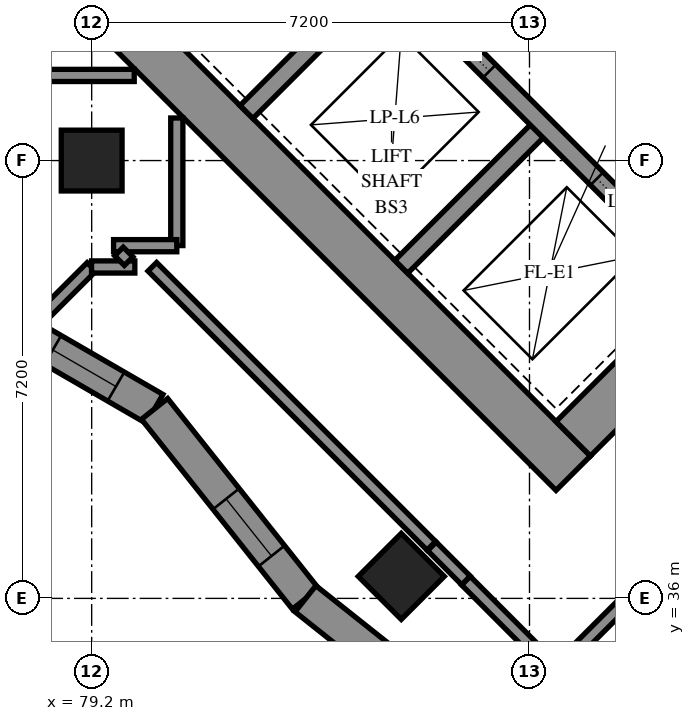
"""IFC4 building model, lengths in metres.
Left out: names, types, materials, properties, quantities, classifications, styles, units other than length and angle.
Written with IfcOpenShell. Run it as: python <this file> out.ifc"""

import sys

from ifc_helpers import new_model, si_unit, direction, frame, frame_2d, origin, origin_2d, place, context, subcontext, project, spatial, polyline, rectangle, outline, extrude, element, fill, save


model = new_model("IFC4")
c1 = context("Model", 3, precision=1e-05, world=origin(), true_north=direction((0.0, 1.0)))
c2 = subcontext(c1, "Body", "Model", "MODEL_VIEW")
j1 = project(units=[si_unit("LENGTHUNIT", "METRE"), si_unit("PLANEANGLEUNIT", "RADIAN")], contexts=[c1])
p1 = place(None, origin())
s1 = spatial("IfcSite", under=j1, at=p1, CompositionType="ELEMENT")
p2 = place(p1, origin())
s2 = spatial("IfcBuilding", under=s1, at=p2, CompositionType="ELEMENT")
p3 = place(p2, frame((0.0, 0.0, 98.2)))
s3 = spatial("IfcBuildingStorey", under=s2, at=p3, CompositionType="ELEMENT", Elevation=98.2)
for number, where, z_axis, x_axis in (
    (1, (79.2, 43.2, 0.0), (0.0, 0.0, 1.0), (1.0, 0.0, 0.0)),
    (2, (84.291, 36.362, 0.0), (0.0, 0.0, 1.0), (0.707, -0.707, 0.0)),
):
    element("IfcColumn", number, at=place(p3, frame(where, z_axis=z_axis, x_axis=x_axis)), inside=s3, PredefinedType="COLUMN", context=c2, shape_type="SweptSolid", body=[
        extrude(rectangle(XDim=1.0, YDim=1.0, at=origin_2d()), origin(), (0.0, 0.0, 1.0), 3.1),
    ])
p4 = place(p3, frame((75.806, 49.373, -0.3), z_axis=(0.0, 0.0, 1.0), x_axis=(0.7071067812, -0.7071067812, 0.0)))
e3 = element("IfcWall", 3, at=p4, inside=s3, PredefinedType="SHEAR", context=c2, shape_type="SweptSolid", body=[
    extrude(rectangle(XDim=16.0, YDim=0.8, at=frame_2d((8.0, 0.0))), origin(), (0.0, 0.0, 1.0), 2.7),
])
p5 = place(p3, frame((87.12, 38.625, -0.3), z_axis=(0.0, 0.0, 1.0), x_axis=(0.7071067812, 0.7071067812, 0.0)))
e4 = element("IfcWall", 4, at=p5, inside=s3, PredefinedType="SHEAR", context=c2, shape_type="SweptSolid", body=[
    extrude(rectangle(XDim=14.4, YDim=0.8, at=frame_2d((7.2, 0.0))), origin(), (0.0, 0.0, 1.0), 2.7),
])
p6 = place(p5, frame((4.55, 0.0, 0.3)))
e5 = element("IfcOpeningElement", 5, at=p6, cuts=e4, PredefinedType="OPENING", context=c2, shape_type="SweptSolid", body=[
    extrude(rectangle(XDim=1.1, YDim=2.1, at=frame_2d((0.55, 1.05))), frame((0.0, 0.41, 0.0), z_axis=(0.0, -1.0, 0.0), x_axis=(1.0, 0.0, 0.0)), (0.0, 0.0, 1.0), 0.82),
])
p7 = place(p5, frame((11.35, 0.0, 0.3)))
e6 = element("IfcOpeningElement", 6, at=p7, cuts=e4, PredefinedType="OPENING", context=c2, shape_type="SweptSolid", body=[
    extrude(rectangle(XDim=1.1, YDim=2.1, at=frame_2d((0.55, 1.05))), frame((0.0, 0.41, 0.0), z_axis=(0.0, -1.0, 0.0), x_axis=(1.0, 0.0, 0.0)), (0.0, 0.0, 1.0), 0.82),
])
for number, where, z_axis, x_axis in (
    (7, (81.746, 43.999, 0.0), (0.0, 0.0, 1.0), (0.707, 0.707, 0.0)),
    (8, (84.291, 41.453, 0.0), (0.0, 0.0, 1.0), (0.707, 0.707, 0.0)),
):
    element("IfcWall", number, at=place(p3, frame(where, z_axis=z_axis, x_axis=x_axis)), inside=s3, PredefinedType="SOLIDWALL", context=c2, shape_type="SweptSolid", body=[
        extrude(rectangle(XDim=3.3, YDim=0.3, at=frame_2d((1.65, 0.0))), origin(), (0.0, 0.0, 1.0), 3.1),
    ])
p8 = place(p3, frame((78.988, 51.423, 0.0), z_axis=(0.0, 0.0, 1.0), x_axis=(0.7071067812, -0.7071067812, 0.0)))
e9 = element("IfcWall", 9, at=p8, inside=s3, PredefinedType="SOLIDWALL", context=c2, shape_type="SweptSolid", body=[
    extrude(rectangle(XDim=14.4, YDim=0.3, at=frame_2d((7.2, 0.0))), origin(), (0.0, 0.0, 1.0), 3.1),
])
p9 = place(p8, frame((1.25, 0.0, 0.0)))
e10 = element("IfcOpeningElement", 10, at=p9, cuts=e9, PredefinedType="OPENING", context=c2, shape_type="SweptSolid", body=[
    extrude(rectangle(XDim=1.1, YDim=2.1, at=frame_2d((0.55, 1.05))), frame((0.0, 0.16, 0.0), z_axis=(0.0, -1.0, 0.0), x_axis=(1.0, 0.0, 0.0)), (0.0, 0.0, 1.0), 0.32),
])
p10 = place(p8, frame((4.85, 0.0, 0.0)))
e11 = element("IfcOpeningElement", 11, at=p10, cuts=e9, PredefinedType="OPENING", context=c2, shape_type="SweptSolid", body=[
    extrude(rectangle(XDim=1.1, YDim=2.1, at=frame_2d((0.55, 1.05))), frame((0.0, 0.16, 0.0), z_axis=(0.0, -1.0, 0.0), x_axis=(1.0, 0.0, 0.0)), (0.0, 0.0, 1.0), 0.32),
])
p11 = place(p8, frame((8.45, 0.0, 0.0)))
e12 = element("IfcOpeningElement", 12, at=p11, cuts=e9, PredefinedType="OPENING", context=c2, shape_type="SweptSolid", body=[
    extrude(rectangle(XDim=1.1, YDim=2.1, at=frame_2d((0.55, 1.05))), frame((0.0, 0.16, 0.0), z_axis=(0.0, -1.0, 0.0), x_axis=(1.0, 0.0, 0.0)), (0.0, 0.0, 1.0), 0.32),
])
p12 = place(p8, frame((12.05, 0.0, 0.0)))
e13 = element("IfcOpeningElement", 13, at=p12, cuts=e9, PredefinedType="OPENING", context=c2, shape_type="SweptSolid", body=[
    extrude(rectangle(XDim=1.1, YDim=2.1, at=frame_2d((0.55, 1.05))), frame((0.0, 0.16, 0.0), z_axis=(0.0, -1.0, 0.0), x_axis=(1.0, 0.0, 0.0)), (0.0, 0.0, 1.0), 0.32),
])
p13 = place(p3, frame((81.534, 53.969, 0.0), z_axis=(0.0, 0.0, 1.0), x_axis=(0.707103309, -0.7071102534, 0.0)))
e14 = element("IfcWall", 14, at=p13, inside=s3, PredefinedType="SOLIDWALL", context=c2, shape_type="SweptSolid", body=[
    extrude(rectangle(XDim=14.4, YDim=0.3, at=frame_2d((7.2, 0.0))), origin(), (0.0, 0.0, 1.0), 3.1),
])
p14 = place(p13, frame((12.05, 0.0, 0.0)))
e15 = element("IfcOpeningElement", 15, at=p14, cuts=e14, PredefinedType="OPENING", context=c2, shape_type="SweptSolid", body=[
    extrude(rectangle(XDim=1.1, YDim=2.1, at=frame_2d((0.55, 1.05))), frame((0.0, 0.16, 0.0), z_axis=(0.0, -1.0, 0.0), x_axis=(1.0, 0.0, 0.0)), (0.0, 0.0, 1.0), 0.32),
])
p15 = place(p3, frame((76.631, 41.203, 0.0), z_axis=(0.0, 0.0, 1.0), x_axis=(0.8653939422, -0.501092132, 0.0)))
e16 = element("IfcWall", 16, at=p15, inside=s3, PredefinedType="SOLIDWALL", context=c2, shape_type="SweptSolid", body=[
    extrude(outline(polyline([(0.031, -0.275), (4.111, -0.275), (4.215, 0.275), (-0.031, 0.275), (0.031, -0.275)])), origin(), (0.0, 0.0, 1.0), 3.1),
])
p16 = place(p15, frame((0.348, 0.0, 0.5)))
e17 = element("IfcOpeningElement", 17, at=p16, cuts=e16, PredefinedType="OPENING", context=c2, shape_type="SweptSolid", body=[
    extrude(rectangle(XDim=1.2, YDim=2.45, at=frame_2d((0.6, 1.225))), frame((0.0, 0.285, 0.0), z_axis=(0.0, -1.0, 0.0), x_axis=(1.0, 0.0, 0.0)), (0.0, 0.0, 1.0), 0.57),
])
p17 = place(p15, frame((2.23, 0.0, 0.5)))
e18 = element("IfcOpeningElement", 18, at=p17, cuts=e16, PredefinedType="OPENING", context=c2, shape_type="SweptSolid", body=[
    extrude(rectangle(XDim=1.2, YDim=2.45, at=frame_2d((0.6, 1.225))), frame((0.0, 0.285, 0.0), z_axis=(0.0, -1.0, 0.0), x_axis=(1.0, 0.0, 0.0)), (0.0, 0.0, 1.0), 0.57),
])
p18 = place(p3, frame((80.234, 39.116, 0.0), z_axis=(0.0, 0.0, 1.0), x_axis=(0.6221724239, -0.782880243, 0.0)))
e19 = element("IfcWall", 19, at=p18, inside=s3, PredefinedType="SOLIDWALL", context=c2, shape_type="SweptSolid", body=[
    extrude(outline(polyline([(0.052, -0.275), (4.02, -0.275), (3.957, 0.275), (-0.052, 0.275), (0.052, -0.275)])), origin(), (0.0, 0.0, 1.0), 3.1),
])
p19 = place(p18, frame((1.891, 0.0, 0.5)))
e20 = element("IfcOpeningElement", 20, at=p19, cuts=e19, PredefinedType="OPENING", context=c2, shape_type="SweptSolid", body=[
    extrude(rectangle(XDim=1.2, YDim=2.45, at=frame_2d((0.6, 1.225))), frame((0.0, 0.285, 0.0), z_axis=(0.0, -1.0, 0.0), x_axis=(1.0, 0.0, 0.0)), (0.0, 0.0, 1.0), 0.57),
])
p20 = place(p3, frame((82.716, 35.994, 0.0), z_axis=(0.0, 0.0, 1.0), x_axis=(0.7828931284, -0.6221562099, 0.0)))
e21 = element("IfcWall", 21, at=p20, inside=s3, PredefinedType="SOLIDWALL", context=c2, shape_type="SweptSolid", body=[
    extrude(outline(polyline([(-0.032, -0.275), (3.937, -0.275), (3.999, 0.275), (0.032, 0.275), (-0.032, -0.275)])), origin(), (0.0, 0.0, 1.0), 3.1),
])
p21 = place(p20, frame((1.714, 0.0, 0.5)))
e22 = element("IfcOpeningElement", 22, at=p21, cuts=e21, PredefinedType="OPENING", context=c2, shape_type="SweptSolid", body=[
    extrude(rectangle(XDim=1.2, YDim=2.45, at=frame_2d((0.6, 1.225))), frame((0.0, 0.285, 0.0), z_axis=(0.0, -1.0, 0.0), x_axis=(1.0, 0.0, 0.0)), (0.0, 0.0, 1.0), 0.57),
])
p22 = place(p3, frame((86.835, 34.806, 0.0), z_axis=(0.0, 0.0, 1.0), x_axis=(0.7071067812, 0.7071067812, 0.0)))
e23 = element("IfcWall", 23, at=p22, inside=s3, PredefinedType="PARTITIONING", context=c2, shape_type="SweptSolid", body=[
    extrude(rectangle(XDim=9.201, YDim=0.2, at=frame_2d((4.601, 0.0))), origin(), (0.0, 0.0, 1.0), 3.1),
])
p23 = place(p3, frame((86.341, 33.315, 0.0), z_axis=(0.0, 0.0, 1.0), x_axis=(0.7069849041, 0.7072286373, 0.0)))
e24 = element("IfcWall", 24, at=p23, inside=s3, PredefinedType="PARTITIONING", context=c2, shape_type="SweptSolid", body=[
    extrude(rectangle(XDim=8.206, YDim=0.2, at=frame_2d((4.103, 0.0))), origin(), (0.0, 0.0, 1.0), 3.1),
])
p24 = place(p3, frame((80.197, 41.453, 0.0), z_axis=(0.0, 0.0, 1.0), x_axis=(0.7071067812, -0.7071067812, 0.0)))
e25 = element("IfcWall", 25, at=p24, inside=s3, PredefinedType="PARTITIONING", context=c2, shape_type="SweptSolid", body=[
    extrude(rectangle(XDim=6.488, YDim=0.2, at=frame_2d((3.244, 0.0))), origin(), (0.0, 0.0, 1.0), 3.1),
])
p25 = place(p3, frame((85.353, 36.293, 0.0), z_axis=(0.0, 0.0, 1.0), x_axis=(0.7066304548, -0.7075827869, 0.0)))
e26 = element("IfcWall", 26, at=p25, inside=s3, PredefinedType="PARTITIONING", context=c2, shape_type="SweptSolid", body=[
    extrude(rectangle(XDim=2.1, YDim=0.2, at=frame_2d((1.05, 0.0))), origin(), (0.0, 0.0, 1.0), 3.1),
])
for number, where, z_axis, x_axis in (
    (27, (77.802, 44.6, 0.0), (0.0, 0.0, 1.0), (1.0, 0.0, 0.0)),
    (28, (80.6, 41.802, 0.0), (0.0, 0.0, 1.0), (0.0, 1.0, 0.0)),
):
    element("IfcWall", number, at=place(p3, frame(where, z_axis=z_axis, x_axis=x_axis)), inside=s3, PredefinedType="PARTITIONING", context=c2, shape_type="SweptSolid", body=[
        extrude(rectangle(XDim=2.098, YDim=0.2, at=frame_2d((1.049, 0.0))), origin(), (0.0, 0.0, 1.0), 3.1),
    ])
p26 = place(p3, frame((78.3, 40.554, 0.0), z_axis=(0.0, 0.0, 1.0), x_axis=(0.7071462414, 0.7070673188, 0.0)))
e29 = element("IfcWall", 29, at=p26, inside=s3, PredefinedType="PARTITIONING", context=c2, shape_type="SweptSolid", body=[
    extrude(rectangle(XDim=1.267, YDim=0.2, at=frame_2d((0.633, 0.0))), origin(), (0.0, 0.0, 1.0), 3.1),
])
p27 = place(p3, frame((79.56, 41.8, 0.0), z_axis=(0.0, 0.0, 1.0), x_axis=(1.0, 0.0, 0.0)))
e30 = element("IfcWall", 30, at=p27, inside=s3, PredefinedType="PARTITIONING", context=c2, shape_type="SweptSolid", body=[
    extrude(rectangle(XDim=1.04, YDim=0.2, at=frame_2d((0.52, 0.0))), origin(), (0.0, 0.0, 1.0), 3.1),
])
p28 = place(p3, frame((84.795, 36.855, 0.0), z_axis=(0.0, 0.0, 1.0), x_axis=(0.7071067812, -0.7071067812, 0.0)))
e31 = element("IfcWall", 31, at=p28, inside=s3, PredefinedType="PARTITIONING", context=c2, shape_type="SweptSolid", body=[
    extrude(rectangle(XDim=0.792, YDim=0.2, at=frame_2d((0.396, 0.0))), origin(), (0.0, 0.0, 1.0), 3.1),
])
p29 = place(p3, frame((79.198, 41.45, 0.0), z_axis=(0.0, 0.0, 1.0), x_axis=(1.0, 0.0, 0.0)))
e32 = element("IfcWall", 32, at=p29, inside=s3, PredefinedType="PARTITIONING", context=c2, shape_type="SweptSolid", body=[
    extrude(rectangle(XDim=0.712, YDim=0.2, at=frame_2d((0.356, 0.0))), origin(), (0.0, 0.0, 1.0), 3.1),
])
p30 = place(p3, frame((79.649, 41.705, 0.0), z_axis=(0.0, 0.0, 1.0), x_axis=(0.7068844555, -0.707329037, 0.0)))
e33 = element("IfcWall", 33, at=p30, inside=s3, PredefinedType="PARTITIONING", context=c2, shape_type="SweptSolid", body=[
    extrude(rectangle(XDim=0.225, YDim=0.2, at=frame_2d((0.112, 0.0))), origin(), (0.0, 0.0, 1.0), 3.1),
])
p31 = place(p17, origin())
e34 = element("IfcWindow", 34, at=p31, inside=s3, PartitioningType="SINGLE_PANEL", PredefinedType="WINDOW", context=c2, shape_type="SweptSolid", body=[
    extrude(rectangle(XDim=1.2, YDim=2.45, at=frame_2d((0.6, 1.225))), frame((0.0, 0.155, 0.0), z_axis=(0.0, -1.0, 0.0), x_axis=(1.0, 0.0, 0.0)), (0.0, 0.0, 1.0), 0.06),
])
fill(e18, e34)
p32 = place(p19, origin())
e35 = element("IfcWindow", 35, at=p32, inside=s3, PartitioningType="SINGLE_PANEL", PredefinedType="WINDOW", context=c2, shape_type="SweptSolid", body=[
    extrude(rectangle(XDim=1.2, YDim=2.45, at=frame_2d((0.6, 1.225))), frame((0.0, 0.155, 0.0), z_axis=(0.0, -1.0, 0.0), x_axis=(1.0, 0.0, 0.0)), (0.0, 0.0, 1.0), 0.06),
])
fill(e20, e35)
p33 = place(p11, origin())
e36 = element("IfcDoor", 36, at=p33, inside=s3, OperationType="SLIDING_TO_LEFT", PredefinedType="DOOR", context=c2, shape_type="SweptSolid", body=[
    extrude(rectangle(XDim=1.1, YDim=2.1, at=frame_2d((0.55, 1.05))), frame((0.0, 0.025, 0.0), z_axis=(0.0, -1.0, 0.0), x_axis=(1.0, 0.0, 0.0)), (0.0, 0.0, 1.0), 0.05),
])
fill(e12, e36)
p34 = place(p12, origin())
e37 = element("IfcDoor", 37, at=p34, inside=s3, OperationType="SLIDING_TO_RIGHT", PredefinedType="DOOR", context=c2, shape_type="SweptSolid", body=[
    extrude(rectangle(XDim=1.1, YDim=2.1, at=frame_2d((0.55, 1.05))), frame((0.0, 0.025, 0.0), z_axis=(0.0, -1.0, 0.0), x_axis=(1.0, 0.0, 0.0)), (0.0, 0.0, 1.0), 0.05),
])
fill(e13, e37)
save(model, sys.argv[1])
